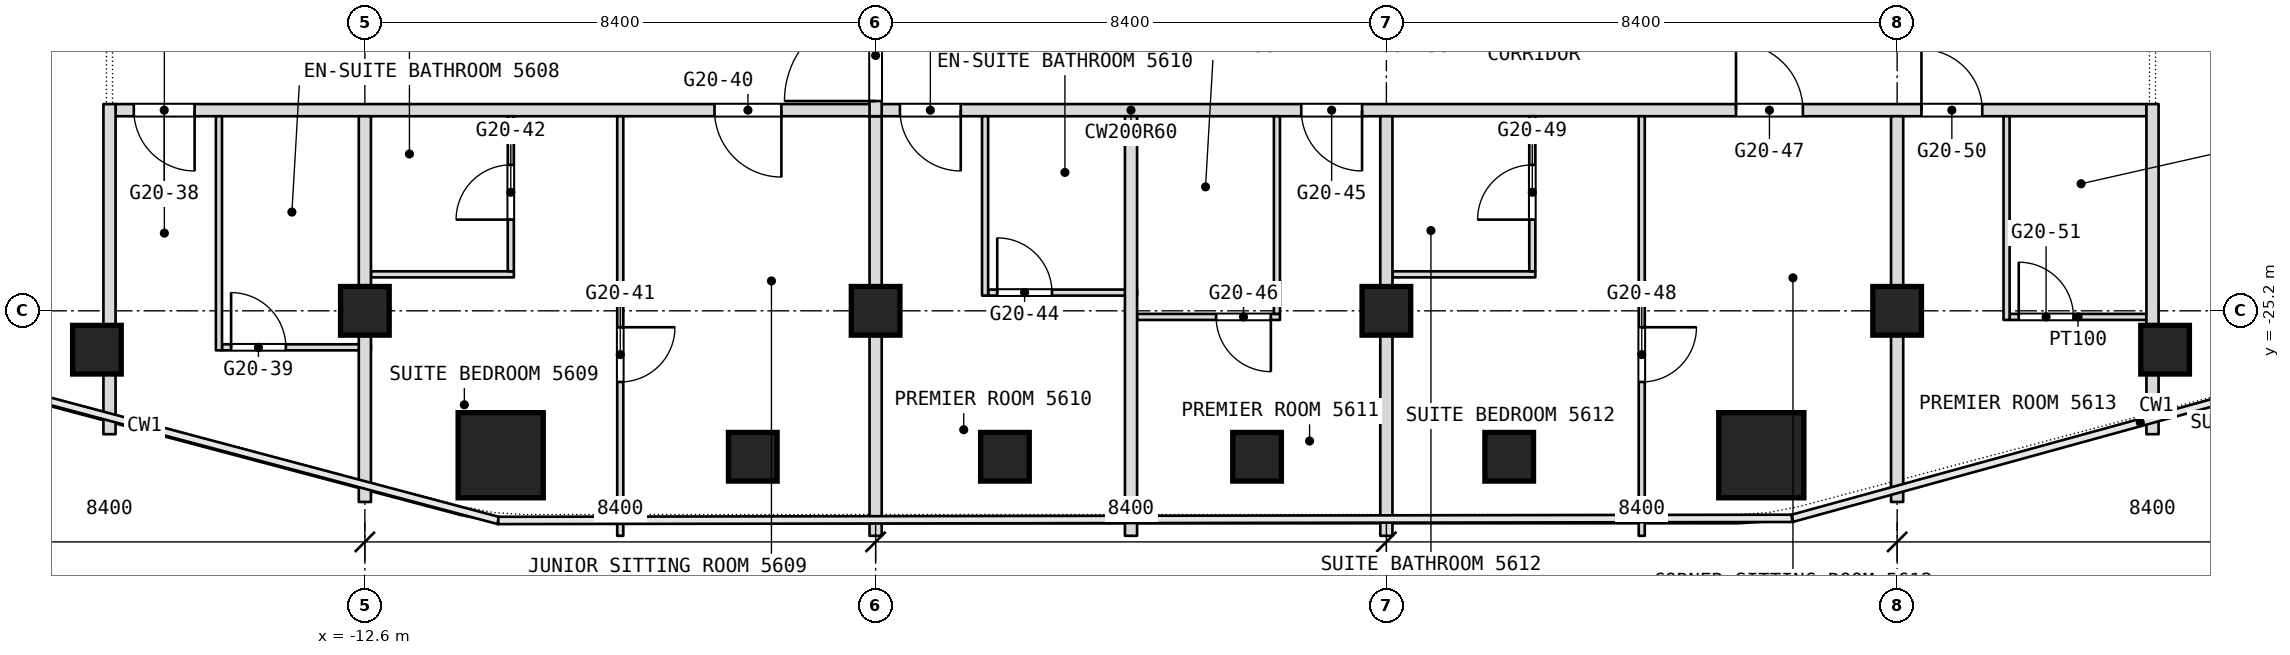
"""IFC4 building model, lengths in metres.
Left out: names, types, materials, properties, quantities, classifications, styles, units other than length and angle.
Written with IfcOpenShell. Run it as: python <this file> out.ifc"""

import sys

from ifc_helpers import new_model, si_unit, direction, frame, frame_2d, origin, origin_2d, place, context, subcontext, project, spatial, rectangle, extrude, element, fill, save


model = new_model("IFC4")
c1 = context("Model", 3, precision=1e-05, world=origin(), true_north=direction((0.0, 1.0)))
c2 = subcontext(c1, "Body", "Model", "MODEL_VIEW")
j1 = project(units=[si_unit("LENGTHUNIT", "METRE"), si_unit("PLANEANGLEUNIT", "RADIAN")], contexts=[c1])
p1 = place(None, origin())
s1 = spatial("IfcSite", under=j1, at=p1, CompositionType="ELEMENT")
p2 = place(p1, origin())
s2 = spatial("IfcBuilding", under=s1, at=p2, CompositionType="ELEMENT")
p3 = place(p2, frame((0.0, 0.0, 238.1)))
s3 = spatial("IfcBuildingStorey", under=s2, at=p3, CompositionType="ELEMENT", Elevation=238.1)
for number, where, z_axis, x_axis in (
    (1, (-10.366, -27.575, 0.0), (0.0, 0.0, 1.0), (1.0, 0.0, 0.0)),
    (2, (10.366, -27.575, 0.0), (0.0, 0.0, 1.0), (1.0, 0.0, 0.0)),
):
    element("IfcColumn", number, at=place(p3, frame(where, z_axis=z_axis, x_axis=x_axis)), inside=s3, PredefinedType="COLUMN", context=c2, shape_type="SweptSolid", body=[
        extrude(rectangle(XDim=1.4, YDim=1.4, at=origin_2d()), origin(), (0.0, 0.0, 1.0), 3.6),
    ])
for number, where, z_axis, x_axis in (
    (3, (-12.6, -25.2, 0.0), (0.0, 0.0, 1.0), (1.0, 0.0, 0.0)),
    (4, (-4.2, -25.2, 0.0), (0.0, 0.0, 1.0), (1.0, 0.0, 0.0)),
    (5, (4.2, -25.2, 0.0), (0.0, 0.0, 1.0), (1.0, 0.0, 0.0)),
    (6, (12.6, -25.2, 0.0), (0.0, 0.0, 1.0), (1.0, 0.0, 0.0)),
    (7, (17.007, -25.839, 0.0), (0.0, 0.0, 1.0), (1.0, 0.0, 0.0)),
    (8, (6.22, -27.6, 0.0), (0.0, 0.0, 1.0), (1.0, 0.0, 0.0)),
    (9, (2.073, -27.6, 0.0), (0.0, 0.0, 1.0), (1.0, 0.0, 0.0)),
    (10, (-2.073, -27.6, 0.0), (0.0, 0.0, 1.0), (1.0, 0.0, 0.0)),
    (11, (-6.22, -27.6, 0.0), (0.0, 0.0, 1.0), (1.0, 0.0, 0.0)),
    (12, (-17.007, -25.839, 0.0), (0.0, 0.0, 1.0), (1.0, 0.0, 0.0)),
):
    element("IfcColumn", number, at=place(p3, frame(where, z_axis=z_axis, x_axis=x_axis)), inside=s3, PredefinedType="COLUMN", context=c2, shape_type="SweptSolid", body=[
        extrude(rectangle(XDim=0.8, YDim=0.8, at=origin_2d()), origin(), (0.0, 0.0, 1.0), 3.6),
    ])
p4 = place(p3, frame((-14.95, -25.8, 0.0), z_axis=(0.0, 0.0, 1.0), x_axis=(1.0, 0.0, 0.0)))
e13 = element("IfcWall", 13, at=p4, inside=s3, PredefinedType="PARTITIONING", context=c2, shape_type="SweptSolid", body=[
    extrude(rectangle(XDim=2.45, YDim=0.1, at=frame_2d((1.225, 0.0))), origin(), (0.0, 0.0, 1.0), 3.34),
])
p5 = place(p4, frame((0.15, 0.0, 0.0)))
e14 = element("IfcOpeningElement", 14, at=p5, cuts=e13, PredefinedType="OPENING", context=c2, shape_type="SweptSolid", body=[
    extrude(rectangle(XDim=0.9, YDim=2.1, at=frame_2d((0.45, 1.05))), frame((0.0, 0.05, 0.0), z_axis=(0.0, -1.0, 0.0), x_axis=(1.0, 0.0, 0.0)), (0.0, 0.0, 1.0), 0.1),
])
p6 = place(p3, frame((0.1, -25.3, 0.0), z_axis=(0.0, 0.0, 1.0), x_axis=(1.0, 0.0, 0.0)))
e15 = element("IfcWall", 15, at=p6, inside=s3, PredefinedType="PARTITIONING", context=c2, shape_type="SweptSolid", body=[
    extrude(rectangle(XDim=2.35, YDim=0.1, at=frame_2d((1.175, 0.0))), origin(), (0.0, 0.0, 1.0), 2.94),
])
p7 = place(p6, frame((1.3, 0.0, 0.0)))
e16 = element("IfcOpeningElement", 16, at=p7, cuts=e15, PredefinedType="OPENING", context=c2, shape_type="SweptSolid", body=[
    extrude(rectangle(XDim=0.9, YDim=2.1, at=frame_2d((0.45, 1.05))), frame((0.0, 0.05, 0.0), z_axis=(0.0, -1.0, 0.0), x_axis=(1.0, 0.0, 0.0)), (0.0, 0.0, 1.0), 0.1),
])
p8 = place(p3, frame((14.45, -25.3, 0.0), z_axis=(0.0, 0.0, 1.0), x_axis=(1.0, 0.0, 0.0)))
e17 = element("IfcWall", 17, at=p8, inside=s3, PredefinedType="PARTITIONING", context=c2, shape_type="SweptSolid", body=[
    extrude(rectangle(XDim=2.25, YDim=0.1, at=frame_2d((1.125, 0.0))), origin(), (0.0, 0.0, 1.0), 2.94),
])
p9 = place(p8, frame((0.15, 0.0, 0.0)))
e18 = element("IfcOpeningElement", 18, at=p9, cuts=e17, PredefinedType="OPENING", context=c2, shape_type="SweptSolid", body=[
    extrude(rectangle(XDim=0.9, YDim=2.1, at=frame_2d((0.45, 1.05))), frame((0.0, 0.05, 0.0), z_axis=(0.0, -1.0, 0.0), x_axis=(1.0, 0.0, 0.0)), (0.0, 0.0, 1.0), 0.1),
])
p10 = place(p3, frame((-2.35, -24.9, 0.0), z_axis=(0.0, 0.0, 1.0), x_axis=(1.0, 0.0, 0.0)))
e19 = element("IfcWall", 19, at=p10, inside=s3, PredefinedType="PARTITIONING", context=c2, shape_type="SweptSolid", body=[
    extrude(rectangle(XDim=2.45, YDim=0.1, at=frame_2d((1.225, 0.0))), origin(), (0.0, 0.0, 1.0), 3.34),
])
p11 = place(p10, frame((0.15, 0.0, 0.0)))
e20 = element("IfcOpeningElement", 20, at=p11, cuts=e19, PredefinedType="OPENING", context=c2, shape_type="SweptSolid", body=[
    extrude(rectangle(XDim=0.9, YDim=2.1, at=frame_2d((0.45, 1.05))), frame((0.0, 0.05, 0.0), z_axis=(0.0, -1.0, 0.0), x_axis=(1.0, 0.0, 0.0)), (0.0, 0.0, 1.0), 0.1),
])
p12 = place(p3, frame((-12.5, -24.6, 0.0), z_axis=(0.0, 0.0, 1.0), x_axis=(1.0, 0.0, 0.0)))
e21 = element("IfcWall", 21, at=p12, inside=s3, PredefinedType="PARTITIONING", context=c2, shape_type="SweptSolid", body=[
    extrude(rectangle(XDim=2.35, YDim=0.1, at=frame_2d((1.175, 0.0))), origin(), (0.0, 0.0, 1.0), 3.34),
])
p13 = place(p3, frame((4.3, -24.6, 0.0), z_axis=(0.0, 0.0, 1.0), x_axis=(1.0, 0.0, 0.0)))
e22 = element("IfcWall", 22, at=p13, inside=s3, PredefinedType="PARTITIONING", context=c2, shape_type="SweptSolid", body=[
    extrude(rectangle(XDim=2.35, YDim=0.1, at=frame_2d((1.175, 0.0))), origin(), (0.0, 0.0, 1.0), 3.34),
])
p14 = place(p3, frame((-16.7, -21.9, 0.0), z_axis=(0.0, 0.0, 1.0), x_axis=(1.0, 0.0, 0.0)))
e23 = element("IfcWall", 23, at=p14, inside=s3, PredefinedType="PARTITIONING", context=c2, shape_type="SweptSolid", body=[
    extrude(rectangle(XDim=33.4, YDim=0.2, at=frame_2d((16.7, 0.0))), origin(), (0.0, 0.0, 1.0), 3.34),
])
p15 = place(p14, frame((0.3, 0.0, 0.0)))
e24 = element("IfcOpeningElement", 24, at=p15, cuts=e23, PredefinedType="OPENING", context=c2, shape_type="SweptSolid", body=[
    extrude(rectangle(XDim=1.0, YDim=2.1, at=frame_2d((0.5, 1.05))), frame((0.0, 0.1, 0.0), z_axis=(0.0, -1.0, 0.0), x_axis=(1.0, 0.0, 0.0)), (0.0, 0.0, 1.0), 0.2),
])
p16 = place(p14, frame((9.85, 0.0, 0.0)))
e25 = element("IfcOpeningElement", 25, at=p16, cuts=e23, PredefinedType="OPENING", context=c2, shape_type="SweptSolid", body=[
    extrude(rectangle(XDim=1.1, YDim=2.1, at=frame_2d((0.55, 1.05))), frame((0.0, 0.1, 0.0), z_axis=(0.0, -1.0, 0.0), x_axis=(1.0, 0.0, 0.0)), (0.0, 0.0, 1.0), 0.2),
])
p17 = place(p14, frame((12.9, 0.0, 0.0)))
e26 = element("IfcOpeningElement", 26, at=p17, cuts=e23, PredefinedType="OPENING", context=c2, shape_type="SweptSolid", body=[
    extrude(rectangle(XDim=1.0, YDim=2.1, at=frame_2d((0.5, 1.05))), frame((0.0, 0.1, 0.0), z_axis=(0.0, -1.0, 0.0), x_axis=(1.0, 0.0, 0.0)), (0.0, 0.0, 1.0), 0.2),
])
p18 = place(p14, frame((19.5, 0.0, 0.0)))
e27 = element("IfcOpeningElement", 27, at=p18, cuts=e23, PredefinedType="OPENING", context=c2, shape_type="SweptSolid", body=[
    extrude(rectangle(XDim=1.0, YDim=2.1, at=frame_2d((0.5, 1.05))), frame((0.0, 0.1, 0.0), z_axis=(0.0, -1.0, 0.0), x_axis=(1.0, 0.0, 0.0)), (0.0, 0.0, 1.0), 0.2),
])
p19 = place(p14, frame((26.65, 0.0, 0.0)))
e28 = element("IfcOpeningElement", 28, at=p19, cuts=e23, PredefinedType="OPENING", context=c2, shape_type="SweptSolid", body=[
    extrude(rectangle(XDim=1.1, YDim=2.1, at=frame_2d((0.55, 1.05))), frame((0.0, 0.1, 0.0), z_axis=(0.0, -1.0, 0.0), x_axis=(1.0, 0.0, 0.0)), (0.0, 0.0, 1.0), 0.2),
])
p20 = place(p14, frame((29.7, 0.0, 0.0)))
e29 = element("IfcOpeningElement", 29, at=p20, cuts=e23, PredefinedType="OPENING", context=c2, shape_type="SweptSolid", body=[
    extrude(rectangle(XDim=1.0, YDim=2.1, at=frame_2d((0.5, 1.05))), frame((0.0, 0.1, 0.0), z_axis=(0.0, -1.0, 0.0), x_axis=(1.0, 0.0, 0.0)), (0.0, 0.0, 1.0), 0.2),
])
p21 = place(p3, frame((16.8, -27.229, 0.0), z_axis=(0.0, 0.0, 1.0), x_axis=(0.0, 1.0, 0.0)))
e30 = element("IfcWall", 30, at=p21, inside=s3, PredefinedType="PARTITIONING", context=c2, shape_type="SweptSolid", body=[
    extrude(rectangle(XDim=5.429, YDim=0.2, at=frame_2d((2.714, 0.0))), origin(), (0.0, 0.0, 1.0), 3.34),
])
p22 = place(p3, frame((14.4, -25.35, 0.0), z_axis=(0.0, 0.0, 1.0), x_axis=(0.0, 1.0, 0.0)))
e31 = element("IfcWall", 31, at=p22, inside=s3, PredefinedType="PARTITIONING", context=c2, shape_type="SweptSolid", body=[
    extrude(rectangle(XDim=3.35, YDim=0.1, at=frame_2d((1.675, 0.0))), origin(), (0.0, 0.0, 1.0), 3.34),
])
p23 = place(p3, frame((12.6, -28.343, 0.0), z_axis=(0.0, 0.0, 1.0), x_axis=(0.0, 1.0, 0.0)))
e32 = element("IfcWall", 32, at=p23, inside=s3, PredefinedType="PARTITIONING", context=c2, shape_type="SweptSolid", body=[
    extrude(rectangle(XDim=6.343, YDim=0.2, at=frame_2d((3.171, 0.0))), origin(), (0.0, 0.0, 1.0), 3.34),
])
p24 = place(p3, frame((8.4, -28.9, 0.0), z_axis=(0.0, 0.0, 1.0), x_axis=(0.0, 1.0, 0.0)))
e33 = element("IfcWall", 33, at=p24, inside=s3, PredefinedType="PARTITIONING", context=c2, shape_type="SweptSolid", body=[
    extrude(rectangle(XDim=6.9, YDim=0.1, at=frame_2d((3.45, 0.0))), origin(), (0.0, 0.0, 1.0), 3.34),
])
p25 = place(p24, frame((2.53, 0.0, 0.0)))
e34 = element("IfcOpeningElement", 34, at=p25, cuts=e33, PredefinedType="OPENING", context=c2, shape_type="SweptSolid", body=[
    extrude(rectangle(XDim=0.9, YDim=2.1, at=frame_2d((0.45, 1.05))), frame((0.0, 0.05, 0.0), z_axis=(0.0, -1.0, 0.0), x_axis=(1.0, 0.0, 0.0)), (0.0, 0.0, 1.0), 0.1),
])
p26 = place(p3, frame((6.6, -24.55, 0.0), z_axis=(0.0, 0.0, 1.0), x_axis=(0.0, 1.0, 0.0)))
e35 = element("IfcWall", 35, at=p26, inside=s3, PredefinedType="PARTITIONING", context=c2, shape_type="SweptSolid", body=[
    extrude(rectangle(XDim=2.55, YDim=0.1, at=frame_2d((1.275, 0.0))), origin(), (0.0, 0.0, 1.0), 3.34),
])
p27 = place(p26, frame((0.85, 0.0, 0.0)))
e36 = element("IfcOpeningElement", 36, at=p27, cuts=e35, PredefinedType="OPENING", context=c2, shape_type="SweptSolid", body=[
    extrude(rectangle(XDim=0.9, YDim=2.1, at=frame_2d((0.45, 1.05))), frame((0.0, 0.05, 0.0), z_axis=(0.0, -1.0, 0.0), x_axis=(1.0, 0.0, 0.0)), (0.0, 0.0, 1.0), 0.1),
])
p28 = place(p3, frame((4.2, -28.9, 0.0), z_axis=(0.0, 0.0, 1.0), x_axis=(0.0, 1.0, 0.0)))
e37 = element("IfcWall", 37, at=p28, inside=s3, PredefinedType="PARTITIONING", context=c2, shape_type="SweptSolid", body=[
    extrude(rectangle(XDim=6.9, YDim=0.2, at=frame_2d((3.45, 0.0))), origin(), (0.0, 0.0, 1.0), 3.34),
])
p29 = place(p3, frame((2.4, -25.25, 0.0), z_axis=(0.0, 0.0, 1.0), x_axis=(0.0, 1.0, 0.0)))
e38 = element("IfcWall", 38, at=p29, inside=s3, PredefinedType="PARTITIONING", context=c2, shape_type="SweptSolid", body=[
    extrude(rectangle(XDim=3.25, YDim=0.1, at=frame_2d((1.625, 0.0))), origin(), (0.0, 0.0, 1.0), 3.34),
])
p30 = place(p3, frame((0.0, -28.9, 0.0), z_axis=(0.0, 0.0, 1.0), x_axis=(0.0, 1.0, 0.0)))
e39 = element("IfcWall", 39, at=p30, inside=s3, PredefinedType="PARTITIONING", context=c2, shape_type="SweptSolid", body=[
    extrude(rectangle(XDim=6.9, YDim=0.2, at=frame_2d((3.45, 0.0))), origin(), (0.0, 0.0, 1.0), 3.34),
])
p31 = place(p3, frame((-2.4, -24.95, 0.0), z_axis=(0.0, 0.0, 1.0), x_axis=(0.0, 1.0, 0.0)))
e40 = element("IfcWall", 40, at=p31, inside=s3, PredefinedType="PARTITIONING", context=c2, shape_type="SweptSolid", body=[
    extrude(rectangle(XDim=2.95, YDim=0.1, at=frame_2d((1.475, 0.0))), origin(), (0.0, 0.0, 1.0), 3.34),
])
p32 = place(p3, frame((-4.2, -28.9, 0.0), z_axis=(0.0, 0.0, 1.0), x_axis=(0.0, 1.0, 0.0)))
e41 = element("IfcWall", 41, at=p32, inside=s3, PredefinedType="PARTITIONING", context=c2, shape_type="SweptSolid", body=[
    extrude(rectangle(XDim=6.9, YDim=0.2, at=frame_2d((3.45, 0.0))), origin(), (0.0, 0.0, 1.0), 3.34),
])
p33 = place(p3, frame((-4.2, -22.0, 0.0), z_axis=(0.0, 0.0, 1.0), x_axis=(0.0, 1.0, 0.0)))
e42 = element("IfcWall", 42, at=p33, inside=s3, PredefinedType="PARTITIONING", context=c2, shape_type="SweptSolid", body=[
    extrude(rectangle(XDim=8.4, YDim=0.2, at=frame_2d((4.2, 0.0))), origin(), (0.0, 0.0, 1.0), 3.34),
])
p34 = place(p33, frame((0.25, 0.0, 0.0)))
e43 = element("IfcOpeningElement", 43, at=p34, cuts=e42, PredefinedType="OPENING", context=c2, shape_type="SweptSolid", body=[
    extrude(rectangle(XDim=1.5, YDim=2.1, at=frame_2d((0.75, 1.05))), frame((0.0, 0.1, 0.0), z_axis=(0.0, -1.0, 0.0), x_axis=(1.0, 0.0, 0.0)), (0.0, 0.0, 1.0), 0.2),
])
p35 = place(p3, frame((-8.4, -28.9, 0.0), z_axis=(0.0, 0.0, 1.0), x_axis=(0.0, 1.0, 0.0)))
e44 = element("IfcWall", 44, at=p35, inside=s3, PredefinedType="PARTITIONING", context=c2, shape_type="SweptSolid", body=[
    extrude(rectangle(XDim=6.9, YDim=0.1, at=frame_2d((3.45, 0.0))), origin(), (0.0, 0.0, 1.0), 3.34),
])
p36 = place(p35, frame((2.53, 0.0, 0.0)))
e45 = element("IfcOpeningElement", 45, at=p36, cuts=e44, PredefinedType="OPENING", context=c2, shape_type="SweptSolid", body=[
    extrude(rectangle(XDim=0.9, YDim=2.1, at=frame_2d((0.45, 1.05))), frame((0.0, 0.05, 0.0), z_axis=(0.0, -1.0, 0.0), x_axis=(1.0, 0.0, 0.0)), (0.0, 0.0, 1.0), 0.1),
])
p37 = place(p3, frame((-10.2, -24.55, 0.0), z_axis=(0.0, 0.0, 1.0), x_axis=(0.0, 1.0, 0.0)))
e46 = element("IfcWall", 46, at=p37, inside=s3, PredefinedType="PARTITIONING", context=c2, shape_type="SweptSolid", body=[
    extrude(rectangle(XDim=2.55, YDim=0.1, at=frame_2d((1.275, 0.0))), origin(), (0.0, 0.0, 1.0), 3.34),
])
p38 = place(p37, frame((0.85, 0.0, 0.0)))
e47 = element("IfcOpeningElement", 47, at=p38, cuts=e46, PredefinedType="OPENING", context=c2, shape_type="SweptSolid", body=[
    extrude(rectangle(XDim=0.9, YDim=2.1, at=frame_2d((0.45, 1.05))), frame((0.0, 0.05, 0.0), z_axis=(0.0, -1.0, 0.0), x_axis=(1.0, 0.0, 0.0)), (0.0, 0.0, 1.0), 0.1),
])
p39 = place(p3, frame((-12.6, -28.343, 0.0), z_axis=(0.0, 0.0, 1.0), x_axis=(0.0, 1.0, 0.0)))
e48 = element("IfcWall", 48, at=p39, inside=s3, PredefinedType="PARTITIONING", context=c2, shape_type="SweptSolid", body=[
    extrude(rectangle(XDim=6.343, YDim=0.2, at=frame_2d((3.171, 0.0))), origin(), (0.0, 0.0, 1.0), 3.34),
])
p40 = place(p3, frame((-15.0, -25.85, 0.0), z_axis=(0.0, 0.0, 1.0), x_axis=(0.0, 1.0, 0.0)))
e49 = element("IfcWall", 49, at=p40, inside=s3, PredefinedType="PARTITIONING", context=c2, shape_type="SweptSolid", body=[
    extrude(rectangle(XDim=3.85, YDim=0.1, at=frame_2d((1.925, 0.0))), origin(), (0.0, 0.0, 1.0), 3.34),
])
p41 = place(p3, frame((-16.8, -27.229, 0.0), z_axis=(0.0, 0.0, 1.0), x_axis=(0.0, 1.0, 0.0)))
e50 = element("IfcWall", 50, at=p41, inside=s3, PredefinedType="PARTITIONING", context=c2, shape_type="SweptSolid", body=[
    extrude(rectangle(XDim=5.429, YDim=0.2, at=frame_2d((2.714, 0.0))), origin(), (0.0, 0.0, 1.0), 3.34),
])
p42 = place(p5, origin())
e51 = element("IfcDoor", 51, at=p42, inside=s3, OperationType="SINGLE_SWING_LEFT", PredefinedType="DOOR", context=c2, shape_type="SweptSolid", body=[
    extrude(rectangle(XDim=0.9, YDim=2.1, at=frame_2d((0.45, 1.05))), frame((0.0, 0.025, 0.0), z_axis=(0.0, -1.0, 0.0), x_axis=(1.0, 0.0, 0.0)), (0.0, 0.0, 1.0), 0.05),
])
fill(e14, e51)
p43 = place(p7, origin())
e52 = element("IfcDoor", 52, at=p43, inside=s3, OperationType="SINGLE_SWING_RIGHT", PredefinedType="DOOR", context=c2, shape_type="SweptSolid", body=[
    extrude(rectangle(XDim=0.9, YDim=2.1, at=frame_2d((0.45, 1.05))), frame((0.0, 0.025, 0.0), z_axis=(0.0, -1.0, 0.0), x_axis=(1.0, 0.0, 0.0)), (0.0, 0.0, 1.0), 0.05),
])
fill(e16, e52)
p44 = place(p9, origin())
e53 = element("IfcDoor", 53, at=p44, inside=s3, OperationType="SINGLE_SWING_LEFT", PredefinedType="DOOR", context=c2, shape_type="SweptSolid", body=[
    extrude(rectangle(XDim=0.9, YDim=2.1, at=frame_2d((0.45, 1.05))), frame((0.0, 0.025, 0.0), z_axis=(0.0, -1.0, 0.0), x_axis=(1.0, 0.0, 0.0)), (0.0, 0.0, 1.0), 0.05),
])
fill(e18, e53)
p45 = place(p11, origin())
e54 = element("IfcDoor", 54, at=p45, inside=s3, OperationType="SINGLE_SWING_LEFT", PredefinedType="DOOR", context=c2, shape_type="SweptSolid", body=[
    extrude(rectangle(XDim=0.9, YDim=2.1, at=frame_2d((0.45, 1.05))), frame((0.0, 0.025, 0.0), z_axis=(0.0, -1.0, 0.0), x_axis=(1.0, 0.0, 0.0)), (0.0, 0.0, 1.0), 0.05),
])
fill(e20, e54)
p46 = place(p15, origin())
e55 = element("IfcDoor", 55, at=p46, inside=s3, OperationType="SINGLE_SWING_RIGHT", PredefinedType="DOOR", context=c2, shape_type="SweptSolid", body=[
    extrude(rectangle(XDim=1.0, YDim=2.1, at=frame_2d((0.5, 1.05))), frame((0.0, 0.025, 0.0), z_axis=(0.0, -1.0, 0.0), x_axis=(1.0, 0.0, 0.0)), (0.0, 0.0, 1.0), 0.05),
])
fill(e24, e55)
p47 = place(p16, origin())
e56 = element("IfcDoor", 56, at=p47, inside=s3, OperationType="SINGLE_SWING_RIGHT", PredefinedType="DOOR", context=c2, shape_type="SweptSolid", body=[
    extrude(rectangle(XDim=1.1, YDim=2.1, at=frame_2d((0.55, 1.05))), frame((0.0, 0.025, 0.0), z_axis=(0.0, -1.0, 0.0), x_axis=(1.0, 0.0, 0.0)), (0.0, 0.0, 1.0), 0.05),
])
fill(e25, e56)
p48 = place(p17, origin())
e57 = element("IfcDoor", 57, at=p48, inside=s3, OperationType="SINGLE_SWING_LEFT", PredefinedType="DOOR", context=c2, shape_type="SweptSolid", body=[
    extrude(rectangle(XDim=1.0, YDim=2.1, at=frame_2d((0.5, 1.05))), frame((0.0, 0.025, 0.0), z_axis=(0.0, -1.0, 0.0), x_axis=(1.0, 0.0, 0.0)), (0.0, 0.0, 1.0), 0.05),
])
fill(e26, e57)
p49 = place(p18, origin())
e58 = element("IfcDoor", 58, at=p49, inside=s3, OperationType="SINGLE_SWING_LEFT", PredefinedType="DOOR", context=c2, shape_type="SweptSolid", body=[
    extrude(rectangle(XDim=1.0, YDim=2.1, at=frame_2d((0.5, 1.05))), frame((0.0, 0.025, 0.0), z_axis=(0.0, -1.0, 0.0), x_axis=(1.0, 0.0, 0.0)), (0.0, 0.0, 1.0), 0.05),
])
fill(e27, e58)
p50 = place(p19, origin())
e59 = element("IfcDoor", 59, at=p50, inside=s3, OperationType="SINGLE_SWING_LEFT", PredefinedType="DOOR", context=c2, shape_type="SweptSolid", body=[
    extrude(rectangle(XDim=1.1, YDim=2.1, at=frame_2d((0.55, 1.05))), frame((0.0, 0.025, 0.0), z_axis=(0.0, -1.0, 0.0), x_axis=(1.0, 0.0, 0.0)), (0.0, 0.0, 1.0), 0.05),
])
fill(e28, e59)
p51 = place(p20, origin())
e60 = element("IfcDoor", 60, at=p51, inside=s3, OperationType="SINGLE_SWING_RIGHT", PredefinedType="DOOR", context=c2, shape_type="SweptSolid", body=[
    extrude(rectangle(XDim=1.0, YDim=2.1, at=frame_2d((0.5, 1.05))), frame((0.0, 0.025, 0.0), z_axis=(0.0, -1.0, 0.0), x_axis=(1.0, 0.0, 0.0)), (0.0, 0.0, 1.0), 0.05),
])
fill(e29, e60)
p52 = place(p25, origin())
e61 = element("IfcDoor", 61, at=p52, inside=s3, OperationType="SINGLE_SWING_LEFT", PredefinedType="DOOR", context=c2, shape_type="SweptSolid", body=[
    extrude(rectangle(XDim=0.9, YDim=2.1, at=frame_2d((0.45, 1.05))), frame((0.0, 0.025, 0.0), z_axis=(0.0, -1.0, 0.0), x_axis=(1.0, 0.0, 0.0)), (0.0, 0.0, 1.0), 0.05),
])
fill(e34, e61)
p53 = place(p27, origin())
e62 = element("IfcDoor", 62, at=p53, inside=s3, OperationType="SINGLE_SWING_RIGHT", PredefinedType="DOOR", context=c2, shape_type="SweptSolid", body=[
    extrude(rectangle(XDim=0.9, YDim=2.1, at=frame_2d((0.45, 1.05))), frame((0.0, 0.025, 0.0), z_axis=(0.0, -1.0, 0.0), x_axis=(1.0, 0.0, 0.0)), (0.0, 0.0, 1.0), 0.05),
])
fill(e36, e62)
p54 = place(p36, origin())
e63 = element("IfcDoor", 63, at=p54, inside=s3, OperationType="SINGLE_SWING_LEFT", PredefinedType="DOOR", context=c2, shape_type="SweptSolid", body=[
    extrude(rectangle(XDim=0.9, YDim=2.1, at=frame_2d((0.45, 1.05))), frame((0.0, 0.025, 0.0), z_axis=(0.0, -1.0, 0.0), x_axis=(1.0, 0.0, 0.0)), (0.0, 0.0, 1.0), 0.05),
])
fill(e45, e63)
p55 = place(p38, origin())
e64 = element("IfcDoor", 64, at=p55, inside=s3, OperationType="SINGLE_SWING_RIGHT", PredefinedType="DOOR", context=c2, shape_type="SweptSolid", body=[
    extrude(rectangle(XDim=0.9, YDim=2.1, at=frame_2d((0.45, 1.05))), frame((0.0, 0.025, 0.0), z_axis=(0.0, -1.0, 0.0), x_axis=(1.0, 0.0, 0.0)), (0.0, 0.0, 1.0), 0.05),
])
fill(e47, e64)
p56 = place(p34, origin())
e65 = element("IfcDoor", 65, at=p56, inside=s3, OperationType="DOUBLE_DOOR_DOUBLE_SWING", PredefinedType="DOOR", context=c2, shape_type="SweptSolid", body=[
    extrude(rectangle(XDim=1.5, YDim=2.1, at=frame_2d((0.75, 1.05))), frame((0.0, 0.025, 0.0), z_axis=(0.0, -1.0, 0.0), x_axis=(1.0, 0.0, 0.0)), (0.0, 0.0, 1.0), 0.05),
])
fill(e43, e65)
save(model, sys.argv[1])
